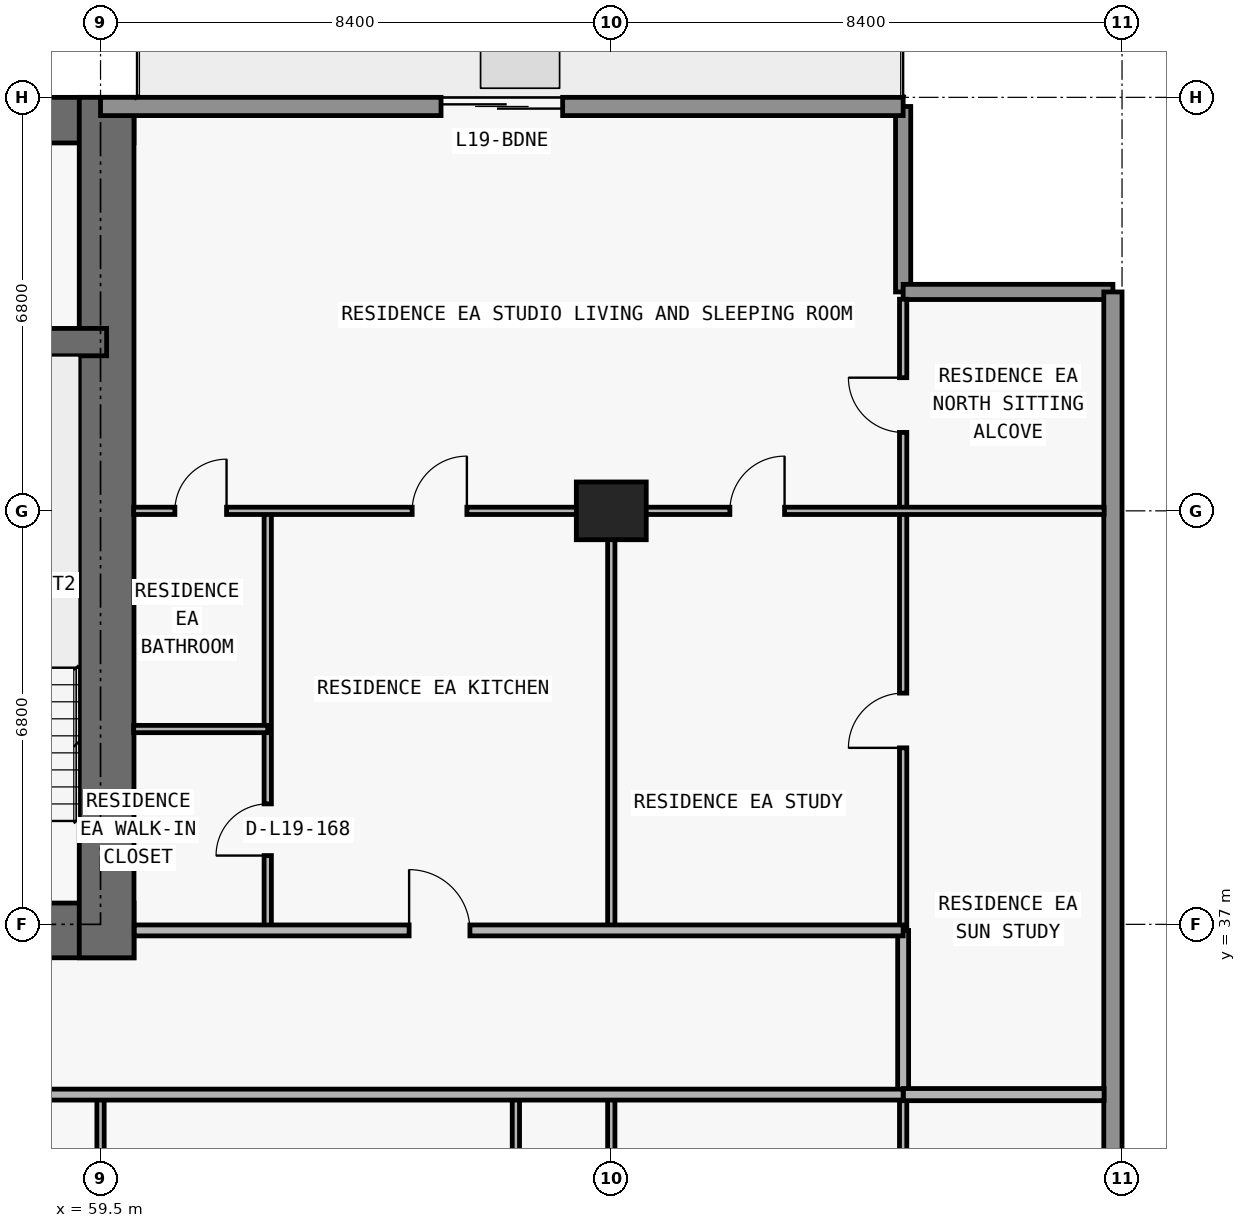
"""IFC4 building model, lengths in metres.
Left out: names, types, materials, properties, quantities, classifications, styles, units other than length and angle.
Written with IfcOpenShell. Run it as: python <this file> out.ifc"""

import sys

from ifc_helpers import new_model, si_unit, direction, frame, frame_2d, origin, origin_2d, place, context, subcontext, project, spatial, rectangle, extrude, element, fill, save


model = new_model("IFC4")
c1 = context("Model", 3, precision=1e-05, world=origin(), true_north=direction((0.0, 1.0)))
c2 = subcontext(c1, "Body", "Model", "MODEL_VIEW")
j1 = project(units=[si_unit("LENGTHUNIT", "METRE"), si_unit("PLANEANGLEUNIT", "RADIAN")], contexts=[c1])
p1 = place(None, origin())
s1 = spatial("IfcSite", under=j1, at=p1, CompositionType="ELEMENT")
p2 = place(p1, origin())
s2 = spatial("IfcBuilding", under=s1, at=p2, CompositionType="ELEMENT")
p3 = place(p2, frame((0.0, 0.0, 72.9)))
s3 = spatial("IfcBuildingStorey", under=s2, at=p3, CompositionType="ELEMENT", Elevation=72.9)
p4 = place(p3, frame((67.9, 43.8, 0.0), z_axis=(0.0, 0.0, 1.0), x_axis=(1.0, 0.0, 0.0)))
e1 = element("IfcColumn", 1, at=p4, inside=s3, PredefinedType="COLUMN", context=c2, shape_type="SweptSolid", body=[
    extrude(rectangle(XDim=1.15, YDim=0.95, at=origin_2d()), origin(), (0.0, 0.0, 1.0), 3.05),
])
p5 = place(p3, frame((17.75, 36.9, 0.0), z_axis=(0.0, 0.0, 1.0), x_axis=(1.0, 0.0, 0.0)))
e2 = element("IfcWall", 2, at=p5, inside=s3, PredefinedType="SHEAR", context=c2, shape_type="SweptSolid", body=[
    extrude(rectangle(XDim=42.3, YDim=0.9, at=frame_2d((21.15, 0.0))), origin(), (0.0, 0.0, 1.0), 3.05),
])
p6 = place(p5, frame((14.55, 0.0, 0.0)))
e3 = element("IfcOpeningElement", 3, at=p6, cuts=e2, PredefinedType="OPENING", context=c2, shape_type="SweptSolid", body=[
    extrude(rectangle(XDim=1.1, YDim=2.15, at=frame_2d((0.55, 1.075))), frame((0.0, 0.46, 0.0), z_axis=(0.0, -1.0, 0.0), x_axis=(1.0, 0.0, 0.0)), (0.0, 0.0, 1.0), 0.92),
])
p7 = place(p5, frame((6.4, 0.0, 0.0)))
e4 = element("IfcOpeningElement", 4, at=p7, cuts=e2, PredefinedType="OPENING", context=c2, shape_type="SweptSolid", body=[
    extrude(rectangle(XDim=1.05, YDim=2.15, at=frame_2d((0.525, 1.075))), frame((0.0, 0.46, 0.0), z_axis=(0.0, -1.0, 0.0), x_axis=(1.0, 0.0, 0.0)), (0.0, 0.0, 1.0), 0.92),
])
p8 = place(p5, frame((34.9, 0.0, 0.0)))
e5 = element("IfcOpeningElement", 5, at=p8, cuts=e2, PredefinedType="OPENING", context=c2, shape_type="SweptSolid", body=[
    extrude(rectangle(XDim=1.05, YDim=2.15, at=frame_2d((0.525, 1.075))), frame((0.0, 0.46, 0.0), z_axis=(0.0, -1.0, 0.0), x_axis=(1.0, 0.0, 0.0)), (0.0, 0.0, 1.0), 0.92),
])
p9 = place(p5, frame((11.012, 0.0, 0.0)))
e6 = element("IfcOpeningElement", 6, at=p9, cuts=e2, PredefinedType="OPENING", context=c2, shape_type="SweptSolid", body=[
    extrude(rectangle(XDim=1.05, YDim=2.15, at=frame_2d((0.525, 1.075))), frame((0.0, 0.46, 0.0), z_axis=(0.0, -1.0, 0.0), x_axis=(1.0, 0.0, 0.0)), (0.0, 0.0, 1.0), 0.92),
])
p10 = place(p5, frame((24.25, 0.0, 0.0)))
e7 = element("IfcOpeningElement", 7, at=p10, cuts=e2, PredefinedType="OPENING", context=c2, shape_type="SweptSolid", body=[
    extrude(rectangle(XDim=1.05, YDim=2.15, at=frame_2d((0.525, 1.075))), frame((0.0, 0.46, 0.0), z_axis=(0.0, -1.0, 0.0), x_axis=(1.0, 0.0, 0.0)), (0.0, 0.0, 1.0), 0.92),
])
p11 = place(p3, frame((17.75, 50.225, 0.0), z_axis=(0.0, 0.0, 1.0), x_axis=(1.0, 0.0, 0.0)))
e8 = element("IfcWall", 8, at=p11, inside=s3, PredefinedType="SHEAR", context=c2, shape_type="SweptSolid", body=[
    extrude(rectangle(XDim=42.3, YDim=0.75, at=frame_2d((21.15, 0.0))), origin(), (0.0, 0.0, 1.0), 3.05),
])
p12 = place(p3, frame((59.6, 36.45, 0.0), z_axis=(0.0, 0.0, 1.0), x_axis=(0.0, 1.0, 0.0)))
e9 = element("IfcWall", 9, at=p12, inside=s3, PredefinedType="SHEAR", context=c2, shape_type="SweptSolid", body=[
    extrude(rectangle(XDim=14.15, YDim=0.9, at=frame_2d((7.075, 0.0))), origin(), (0.0, 0.0, 1.0), 3.05),
])
p13 = place(p3, frame((18.2, 46.575, 0.0), z_axis=(0.0, 0.0, 1.0), x_axis=(1.0, 0.0, 0.0)))
e10 = element("IfcWall", 10, at=p13, inside=s3, PredefinedType="SHEAR", context=c2, shape_type="SweptSolid", body=[
    extrude(rectangle(XDim=41.4, YDim=0.45, at=frame_2d((20.7, 0.0))), origin(), (0.0, 0.0, 1.0), 3.05),
])
p14 = place(p13, frame((7.675, 0.0, 0.0)))
e11 = element("IfcOpeningElement", 11, at=p14, cuts=e10, PredefinedType="OPENING", context=c2, shape_type="SweptSolid", body=[
    extrude(rectangle(XDim=1.05, YDim=2.15, at=frame_2d((0.525, 1.075))), frame((0.0, 0.235, 0.0), z_axis=(0.0, -1.0, 0.0), x_axis=(1.0, 0.0, 0.0)), (0.0, 0.0, 1.0), 0.47),
])
p15 = place(p13, frame((32.725, 0.0, 0.0)))
e12 = element("IfcOpeningElement", 12, at=p15, cuts=e10, PredefinedType="OPENING", context=c2, shape_type="SweptSolid", body=[
    extrude(rectangle(XDim=1.05, YDim=2.15, at=frame_2d((0.525, 1.075))), frame((0.0, 0.235, 0.0), z_axis=(0.0, -1.0, 0.0), x_axis=(1.0, 0.0, 0.0)), (0.0, 0.0, 1.0), 0.47),
])
p16 = place(p3, frame((72.7, 50.45, 0.0), z_axis=(0.0, 0.0, 1.0), x_axis=(0.0, -1.0, 0.0)))
e13 = element("IfcWall", 13, at=p16, inside=s3, PredefinedType="ELEMENTEDWALL", context=c2, shape_type="SweptSolid", body=[
    extrude(rectangle(XDim=3.05, YDim=0.25, at=frame_2d((1.525, 0.0))), origin(), (0.0, 0.0, 1.0), 3.05),
])
p17 = place(p3, frame((72.7, 47.4, 0.0), z_axis=(0.0, 0.0, 1.0), x_axis=(1.0, 0.0, 0.0)))
e14 = element("IfcWall", 14, at=p17, inside=s3, PredefinedType="ELEMENTEDWALL", context=c2, shape_type="SweptSolid", body=[
    extrude(rectangle(XDim=3.45, YDim=0.25, at=frame_2d((1.725, 0.0))), origin(), (0.0, 0.0, 1.0), 3.05),
])
p18 = place(p3, frame((76.15, 47.4, 0.0), z_axis=(0.0, 0.0, 1.0), x_axis=(0.0, -1.0, 0.0)))
e15 = element("IfcWall", 15, at=p18, inside=s3, PredefinedType="STANDARD", context=c2, shape_type="SweptSolid", body=[
    extrude(rectangle(XDim=20.6, YDim=0.3, at=frame_2d((10.3, 0.0))), origin(), (0.0, 0.0, 1.0), 3.05),
])
p19 = place(p3, frame((59.5, 50.45, 0.0), z_axis=(0.0, 0.0, 1.0), x_axis=(1.0, 0.0, 0.0)))
e16 = element("IfcWall", 16, at=p19, inside=s3, PredefinedType="STANDARD", context=c2, shape_type="SweptSolid", body=[
    extrude(rectangle(XDim=13.2, YDim=0.3, at=frame_2d((6.6, 0.0))), origin(), (0.0, 0.0, 1.0), 3.05),
])
p20 = place(p19, frame((5.6, 0.0, 0.0)))
e17 = element("IfcOpeningElement", 17, at=p20, cuts=e16, PredefinedType="OPENING", context=c2, shape_type="SweptSolid", body=[
    extrude(rectangle(XDim=2.0, YDim=2.3, at=frame_2d((1.0, 1.15))), frame((0.0, 0.16, 0.0), z_axis=(0.0, -1.0, 0.0), x_axis=(1.0, 0.0, 0.0)), (0.0, 0.0, 1.0), 0.32),
])
p21 = place(p3, frame((59.5, 6.24, 0.0), z_axis=(0.0, 0.0, 1.0), x_axis=(0.0, 1.0, 0.0)))
e18 = element("IfcWall", 18, at=p21, inside=s3, PredefinedType="PARTITIONING", context=c2, shape_type="SweptSolid", body=[
    extrude(rectangle(XDim=27.96, YDim=0.12, at=frame_2d((13.98, 0.0))), origin(), (0.0, 0.0, 1.0), 2.11),
])
p22 = place(p21, frame((19.19, 0.0, 0.0)))
e19 = element("IfcOpeningElement", 19, at=p22, cuts=e18, PredefinedType="OPENING", context=c2, shape_type="SweptSolid", body=[
    extrude(rectangle(XDim=0.9, YDim=2.06, at=frame_2d((0.45, 1.03))), frame((0.0, 0.07, 0.0), z_axis=(0.0, -1.0, 0.0), x_axis=(1.0, 0.0, 0.0)), (0.0, 0.0, 1.0), 0.14),
])
p23 = place(p3, frame((62.25, 36.9, 0.0), z_axis=(0.0, 0.0, 1.0), x_axis=(0.0, 1.0, 0.0)))
e20 = element("IfcWall", 20, at=p23, inside=s3, PredefinedType="PARTITIONING", context=c2, shape_type="SweptSolid", body=[
    extrude(rectangle(XDim=6.9, YDim=0.12, at=frame_2d((3.45, 0.0))), origin(), (0.0, 0.0, 1.0), 3.05),
])
p24 = place(p23, frame((1.231, 0.0, 0.0)))
e21 = element("IfcOpeningElement", 21, at=p24, cuts=e20, PredefinedType="OPENING", context=c2, shape_type="SweptSolid", body=[
    extrude(rectangle(XDim=0.85, YDim=2.1, at=frame_2d((0.425, 1.05))), frame((0.0, 0.07, 0.0), z_axis=(0.0, -1.0, 0.0), x_axis=(1.0, 0.0, 0.0)), (0.0, 0.0, 1.0), 0.14),
])
p25 = place(p3, frame((66.331, 28.08, 0.0), z_axis=(0.0, 0.0, 1.0), x_axis=(0.0, 1.0, 0.0)))
e22 = element("IfcWall", 22, at=p25, inside=s3, PredefinedType="PARTITIONING", context=c2, shape_type="SweptSolid", body=[
    extrude(rectangle(XDim=6.12, YDim=0.12, at=frame_2d((3.06, 0.0))), origin(), (0.0, 0.0, 1.0), 3.05),
])
p26 = place(p25, frame((2.635, 0.0, 0.0)))
e23 = element("IfcOpeningElement", 23, at=p26, cuts=e22, PredefinedType="OPENING", context=c2, shape_type="SweptSolid", body=[
    extrude(rectangle(XDim=0.85, YDim=2.1, at=frame_2d((0.425, 1.05))), frame((0.0, 0.07, 0.0), z_axis=(0.0, -1.0, 0.0), x_axis=(1.0, 0.0, 0.0)), (0.0, 0.0, 1.0), 0.14),
])
p27 = place(p3, frame((67.9, 6.24, 0.0), z_axis=(0.0, 0.0, 1.0), x_axis=(0.0, 1.0, 0.0)))
e24 = element("IfcWall", 24, at=p27, inside=s3, PredefinedType="PARTITIONING", context=c2, shape_type="SweptSolid", body=[
    extrude(rectangle(XDim=27.96, YDim=0.12, at=frame_2d((13.98, 0.0))), origin(), (0.0, 0.0, 1.0), 2.11),
])
p28 = place(p27, frame((19.19, 0.0, 0.0)))
e25 = element("IfcOpeningElement", 25, at=p28, cuts=e24, PredefinedType="OPENING", context=c2, shape_type="SweptSolid", body=[
    extrude(rectangle(XDim=0.9, YDim=2.06, at=frame_2d((0.45, 1.03))), frame((0.0, 0.07, 0.0), z_axis=(0.0, -1.0, 0.0), x_axis=(1.0, 0.0, 0.0)), (0.0, 0.0, 1.0), 0.14),
])
p29 = place(p3, frame((67.9, 36.9, 0.0), z_axis=(0.0, 0.0, 1.0), x_axis=(0.0, 1.0, 0.0)))
e26 = element("IfcWall", 26, at=p29, inside=s3, PredefinedType="PARTITIONING", context=c2, shape_type="SweptSolid", body=[
    extrude(rectangle(XDim=6.9, YDim=0.12, at=frame_2d((3.45, 0.0))), origin(), (0.0, 0.0, 1.0), 2.11),
])
p30 = place(p3, frame((72.7, 6.32, 0.0), z_axis=(0.0, 0.0, 1.0), x_axis=(0.0, 1.0, 0.0)))
e27 = element("IfcWall", 27, at=p30, inside=s3, PredefinedType="PARTITIONING", context=c2, shape_type="SweptSolid", body=[
    extrude(rectangle(XDim=27.88, YDim=0.12, at=frame_2d((13.94, 0.0))), origin(), (0.0, 0.0, 1.0), 3.05),
])
p31 = place(p30, frame((13.49, 0.0, 0.0)))
e28 = element("IfcOpeningElement", 28, at=p31, cuts=e27, PredefinedType="OPENING", context=c2, shape_type="SweptSolid", body=[
    extrude(rectangle(XDim=0.9, YDim=2.15, at=frame_2d((0.45, 1.075))), frame((0.0, 0.07, 0.0), z_axis=(0.0, -1.0, 0.0), x_axis=(1.0, 0.0, 0.0)), (0.0, 0.0, 1.0), 0.14),
])
p32 = place(p3, frame((72.7, 34.205, 0.0), z_axis=(0.0, 0.0, 1.0), x_axis=(0.0, 1.0, 0.0)))
e29 = element("IfcWall", 29, at=p32, inside=s3, PredefinedType="PARTITIONING", context=c2, shape_type="SweptSolid", body=[
    extrude(rectangle(XDim=2.695, YDim=0.18, at=frame_2d((1.347, 0.0))), origin(), (0.0, 0.0, 1.0), 3.05),
])
p33 = place(p3, frame((72.7, 36.905, 0.0), z_axis=(0.0, 0.0, 1.0), x_axis=(0.0, 1.0, 0.0)))
e30 = element("IfcWall", 30, at=p33, inside=s3, PredefinedType="PARTITIONING", context=c2, shape_type="SweptSolid", body=[
    extrude(rectangle(XDim=10.375, YDim=0.12, at=frame_2d((5.188, 0.0))), origin(), (0.0, 0.0, 1.0), 3.05),
])
p34 = place(p33, frame((2.998, 0.0, 0.0)))
e31 = element("IfcOpeningElement", 31, at=p34, cuts=e30, PredefinedType="OPENING", context=c2, shape_type="SweptSolid", body=[
    extrude(rectangle(XDim=0.9, YDim=2.15, at=frame_2d((0.45, 1.075))), frame((0.0, 0.07, 0.0), z_axis=(0.0, -1.0, 0.0), x_axis=(1.0, 0.0, 0.0)), (0.0, 0.0, 1.0), 0.14),
])
p35 = place(p33, frame((8.185, 0.0, 0.0)))
e32 = element("IfcOpeningElement", 32, at=p35, cuts=e30, PredefinedType="OPENING", context=c2, shape_type="SweptSolid", body=[
    extrude(rectangle(XDim=0.9, YDim=2.15, at=frame_2d((0.45, 1.075))), frame((0.0, 0.07, 0.0), z_axis=(0.0, -1.0, 0.0), x_axis=(1.0, 0.0, 0.0)), (0.0, 0.0, 1.0), 0.14),
])
p36 = place(p3, frame((5.105, 34.2, 0.0), z_axis=(0.0, 0.0, 1.0), x_axis=(1.0, 0.0, 0.0)))
e33 = element("IfcWall", 33, at=p36, inside=s3, PredefinedType="PARTITIONING", context=c2, shape_type="SweptSolid", body=[
    extrude(rectangle(XDim=67.595, YDim=0.18, at=frame_2d((33.797, 0.0))), origin(), (0.0, 0.0, 1.0), 3.05),
])
p37 = place(p36, frame((7.639, 0.0, 0.0)))
e34 = element("IfcOpeningElement", 34, at=p37, cuts=e33, PredefinedType="OPENING", context=c2, shape_type="SweptSolid", body=[
    extrude(rectangle(XDim=1.0, YDim=2.2, at=frame_2d((0.5, 1.1))), frame((0.0, 0.1, 0.0), z_axis=(0.0, -1.0, 0.0), x_axis=(1.0, 0.0, 0.0)), (0.0, 0.0, 1.0), 0.2),
])
p38 = place(p36, frame((24.423, 0.0, 0.0)))
e35 = element("IfcOpeningElement", 35, at=p38, cuts=e33, PredefinedType="OPENING", context=c2, shape_type="SweptSolid", body=[
    extrude(rectangle(XDim=1.0, YDim=2.2, at=frame_2d((0.5, 1.1))), frame((0.0, 0.1, 0.0), z_axis=(0.0, -1.0, 0.0), x_axis=(1.0, 0.0, 0.0)), (0.0, 0.0, 1.0), 0.2),
])
p39 = place(p36, frame((48.825, 0.0, 0.0)))
e36 = element("IfcOpeningElement", 36, at=p39, cuts=e33, PredefinedType="OPENING", context=c2, shape_type="SweptSolid", body=[
    extrude(rectangle(XDim=1.0, YDim=2.2, at=frame_2d((0.5, 1.1))), frame((0.0, 0.1, 0.0), z_axis=(0.0, -1.0, 0.0), x_axis=(1.0, 0.0, 0.0)), (0.0, 0.0, 1.0), 0.2),
])
p40 = place(p3, frame((72.705, 34.2, 0.0), z_axis=(0.0, 0.0, 1.0), x_axis=(1.0, 0.0, 0.0)))
e37 = element("IfcWall", 37, at=p40, inside=s3, PredefinedType="PARTITIONING", context=c2, shape_type="SweptSolid", body=[
    extrude(rectangle(XDim=3.3, YDim=0.2, at=frame_2d((1.65, 0.0))), origin(), (0.0, 0.0, 1.0), 3.05),
])
p41 = place(p3, frame((60.055, 36.9, 0.0), z_axis=(0.0, 0.0, 1.0), x_axis=(1.0, 0.0, 0.0)))
e38 = element("IfcWall", 38, at=p41, inside=s3, PredefinedType="PARTITIONING", context=c2, shape_type="SweptSolid", body=[
    extrude(rectangle(XDim=12.645, YDim=0.18, at=frame_2d((6.323, 0.0))), origin(), (0.0, 0.0, 1.0), 3.05),
])
p42 = place(p41, frame((4.52, 0.0, 0.0)))
e39 = element("IfcOpeningElement", 39, at=p42, cuts=e38, PredefinedType="OPENING", context=c2, shape_type="SweptSolid", body=[
    extrude(rectangle(XDim=1.0, YDim=2.2, at=frame_2d((0.5, 1.1))), frame((0.0, 0.1, 0.0), z_axis=(0.0, -1.0, 0.0), x_axis=(1.0, 0.0, 0.0)), (0.0, 0.0, 1.0), 0.2),
])
p43 = place(p3, frame((60.045, 40.212, 0.0), z_axis=(0.0, 0.0, 1.0), x_axis=(1.0, 0.0, 0.0)))
e40 = element("IfcWall", 40, at=p43, inside=s3, PredefinedType="PARTITIONING", context=c2, shape_type="SweptSolid", body=[
    extrude(rectangle(XDim=2.205, YDim=0.12, at=frame_2d((1.103, 0.0))), origin(), (0.0, 0.0, 1.0), 3.05),
])
p44 = place(p3, frame((60.045, 43.8, 0.0), z_axis=(0.0, 0.0, 1.0), x_axis=(1.0, 0.0, 0.0)))
e41 = element("IfcWall", 41, at=p44, inside=s3, PredefinedType="PARTITIONING", context=c2, shape_type="SweptSolid", body=[
    extrude(rectangle(XDim=15.96, YDim=0.12, at=frame_2d((7.98, 0.0))), origin(), (0.0, 0.0, 1.0), 2.339),
])
p45 = place(p44, frame((9.805, 0.0, 0.0)))
e42 = element("IfcOpeningElement", 42, at=p45, cuts=e41, PredefinedType="OPENING", context=c2, shape_type="SweptSolid", body=[
    extrude(rectangle(XDim=0.9, YDim=2.15, at=frame_2d((0.45, 1.075))), frame((0.0, 0.07, 0.0), z_axis=(0.0, -1.0, 0.0), x_axis=(1.0, 0.0, 0.0)), (0.0, 0.0, 1.0), 0.14),
])
p46 = place(p44, frame((4.58, 0.0, 0.0)))
e43 = element("IfcOpeningElement", 43, at=p46, cuts=e41, PredefinedType="OPENING", context=c2, shape_type="SweptSolid", body=[
    extrude(rectangle(XDim=0.9, YDim=2.15, at=frame_2d((0.45, 1.075))), frame((0.0, 0.07, 0.0), z_axis=(0.0, -1.0, 0.0), x_axis=(1.0, 0.0, 0.0)), (0.0, 0.0, 1.0), 0.14),
])
p47 = place(p44, frame((0.677, 0.0, 0.0)))
e44 = element("IfcOpeningElement", 44, at=p47, cuts=e41, PredefinedType="OPENING", context=c2, shape_type="SweptSolid", body=[
    extrude(rectangle(XDim=0.85, YDim=2.1, at=frame_2d((0.425, 1.05))), frame((0.0, 0.07, 0.0), z_axis=(0.0, -1.0, 0.0), x_axis=(1.0, 0.0, 0.0)), (0.0, 0.0, 1.0), 0.14),
])
p48 = place(p20, origin())
e45 = element("IfcDoor", 45, at=p48, inside=s3, OperationType="DOUBLE_DOOR_SLIDING", PredefinedType="DOOR", context=c2, shape_type="SweptSolid", body=[
    extrude(rectangle(XDim=2.0, YDim=2.3, at=frame_2d((1.0, 1.15))), frame((0.0, 0.025, 0.0), z_axis=(0.0, -1.0, 0.0), x_axis=(1.0, 0.0, 0.0)), (0.0, 0.0, 1.0), 0.05),
])
fill(e17, e45)
p49 = place(p45, origin())
e46 = element("IfcDoor", 46, at=p49, inside=s3, OperationType="SINGLE_SWING_RIGHT", PredefinedType="DOOR", context=c2, shape_type="SweptSolid", body=[
    extrude(rectangle(XDim=0.9, YDim=2.15, at=frame_2d((0.45, 1.075))), frame((0.0, 0.025, 0.0), z_axis=(0.0, -1.0, 0.0), x_axis=(1.0, 0.0, 0.0)), (0.0, 0.0, 1.0), 0.05),
])
fill(e42, e46)
p50 = place(p42, origin())
e47 = element("IfcDoor", 47, at=p50, inside=s3, OperationType="SINGLE_SWING_LEFT", PredefinedType="DOOR", context=c2, shape_type="SweptSolid", body=[
    extrude(rectangle(XDim=1.0, YDim=2.2, at=frame_2d((0.5, 1.1))), frame((0.0, 0.025, 0.0), z_axis=(0.0, -1.0, 0.0), x_axis=(1.0, 0.0, 0.0)), (0.0, 0.0, 1.0), 0.05),
])
fill(e39, e47)
p51 = place(p46, origin())
e48 = element("IfcDoor", 48, at=p51, inside=s3, OperationType="SINGLE_SWING_RIGHT", PredefinedType="DOOR", context=c2, shape_type="SweptSolid", body=[
    extrude(rectangle(XDim=0.9, YDim=2.15, at=frame_2d((0.45, 1.075))), frame((0.0, 0.025, 0.0), z_axis=(0.0, -1.0, 0.0), x_axis=(1.0, 0.0, 0.0)), (0.0, 0.0, 1.0), 0.05),
])
fill(e43, e48)
p52 = place(p24, origin())
e49 = element("IfcDoor", 49, at=p52, inside=s3, OperationType="SINGLE_SWING_LEFT", PredefinedType="DOOR", context=c2, shape_type="SweptSolid", body=[
    extrude(rectangle(XDim=0.85, YDim=2.1, at=frame_2d((0.425, 1.05))), frame((0.0, 0.025, 0.0), z_axis=(0.0, -1.0, 0.0), x_axis=(1.0, 0.0, 0.0)), (0.0, 0.0, 1.0), 0.05),
])
fill(e21, e49)
p53 = place(p47, origin())
e50 = element("IfcDoor", 50, at=p53, inside=s3, OperationType="SINGLE_SWING_RIGHT", PredefinedType="DOOR", context=c2, shape_type="SweptSolid", body=[
    extrude(rectangle(XDim=0.85, YDim=2.1, at=frame_2d((0.425, 1.05))), frame((0.0, 0.025, 0.0), z_axis=(0.0, -1.0, 0.0), x_axis=(1.0, 0.0, 0.0)), (0.0, 0.0, 1.0), 0.05),
])
fill(e44, e50)
p54 = place(p34, origin())
e51 = element("IfcDoor", 51, at=p54, inside=s3, OperationType="SINGLE_SWING_LEFT", PredefinedType="DOOR", context=c2, shape_type="SweptSolid", body=[
    extrude(rectangle(XDim=0.9, YDim=2.15, at=frame_2d((0.45, 1.075))), frame((0.0, 0.025, 0.0), z_axis=(0.0, -1.0, 0.0), x_axis=(1.0, 0.0, 0.0)), (0.0, 0.0, 1.0), 0.05),
])
fill(e31, e51)
p55 = place(p35, origin())
e52 = element("IfcDoor", 52, at=p55, inside=s3, OperationType="SINGLE_SWING_RIGHT", PredefinedType="DOOR", context=c2, shape_type="SweptSolid", body=[
    extrude(rectangle(XDim=0.9, YDim=2.15, at=frame_2d((0.45, 1.075))), frame((0.0, 0.025, 0.0), z_axis=(0.0, -1.0, 0.0), x_axis=(1.0, 0.0, 0.0)), (0.0, 0.0, 1.0), 0.05),
])
fill(e32, e52)
save(model, sys.argv[1])
